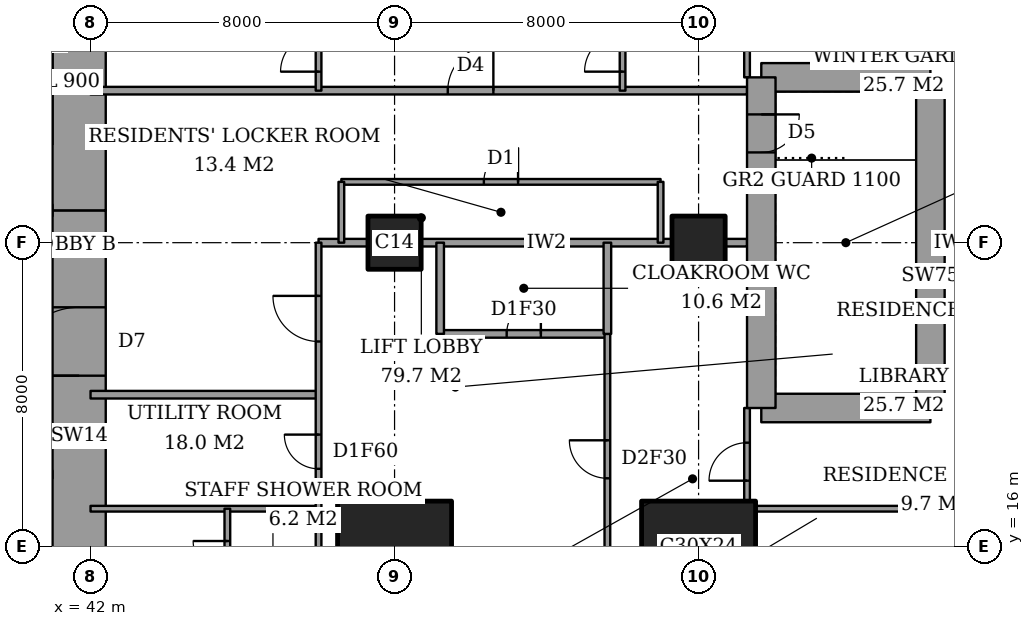
"""IFC4 building model, lengths in metres.
Left out: names, types, materials, properties, quantities, classifications, styles, units other than length and angle.
Written with IfcOpenShell. Run it as: python <this file> out.ifc"""

import sys

from ifc_helpers import new_model, si_unit, direction, frame, frame_2d, origin, origin_2d, place, context, subcontext, project, spatial, rectangle, extrude, element, fill, save


model = new_model("IFC4")
c1 = context("Model", 3, precision=1e-05, world=origin(), true_north=direction((0.0, 1.0)))
c2 = subcontext(c1, "Body", "Model", "MODEL_VIEW")
j1 = project(units=[si_unit("LENGTHUNIT", "METRE"), si_unit("PLANEANGLEUNIT", "RADIAN")], contexts=[c1])
p1 = place(None, origin())
s1 = spatial("IfcSite", under=j1, at=p1, CompositionType="ELEMENT")
p2 = place(p1, origin())
s2 = spatial("IfcBuilding", under=s1, at=p2, CompositionType="ELEMENT")
p3 = place(p2, frame((0.0, 0.0, 287.1)))
s3 = spatial("IfcBuildingStorey", under=s2, at=p3, CompositionType="ELEMENT", Elevation=287.1)
p4 = place(p3, frame((50.0, 16.0, 0.0), z_axis=(0.0, 0.0, 1.0), x_axis=(1.0, 0.0, 0.0)))
e1 = element("IfcColumn", 1, at=p4, inside=s3, PredefinedType="COLUMN", context=c2, shape_type="SweptSolid", body=[
    extrude(rectangle(XDim=3.0, YDim=2.4, at=origin_2d()), origin(), (0.0, 0.0, 1.0), 4.5),
])
p5 = place(p3, frame((50.0, 24.0, 0.0), z_axis=(0.0, 0.0, 1.0), x_axis=(1.0, 0.0, 0.0)))
e2 = element("IfcColumn", 2, at=p5, inside=s3, PredefinedType="COLUMN", context=c2, shape_type="SweptSolid", body=[
    extrude(rectangle(XDim=1.4, YDim=1.4, at=origin_2d()), origin(), (0.0, 0.0, 1.0), 4.5),
])
p6 = place(p3, frame((58.0, 16.0, 0.0), z_axis=(0.0, 0.0, 1.0), x_axis=(1.0, 0.0, 0.0)))
e3 = element("IfcColumn", 3, at=p6, inside=s3, PredefinedType="COLUMN", context=c2, shape_type="SweptSolid", body=[
    extrude(rectangle(XDim=3.0, YDim=2.4, at=origin_2d()), origin(), (0.0, 0.0, 1.0), 4.5),
])
p7 = place(p3, frame((58.0, 24.0, 0.0), z_axis=(0.0, 0.0, 1.0), x_axis=(1.0, 0.0, 0.0)))
e4 = element("IfcColumn", 4, at=p7, inside=s3, PredefinedType="COLUMN", context=c2, shape_type="SweptSolid", body=[
    extrude(rectangle(XDim=1.4, YDim=1.4, at=origin_2d()), origin(), (0.0, 0.0, 1.0), 4.5),
])
p8 = place(p3, frame((41.7, 13.0, 0.0), z_axis=(0.0, 0.0, 1.0), x_axis=(0.0, 1.0, 0.0)))
e5 = element("IfcWall", 5, at=p8, inside=s3, PredefinedType="SHEAR", context=c2, shape_type="SweptSolid", body=[
    extrude(rectangle(XDim=11.85, YDim=1.4, at=frame_2d((5.925, 0.0))), origin(), (0.0, 0.0, 1.0), 4.5),
])
p9 = place(p8, frame((7.5, 0.0, 0.0)))
e6 = element("IfcOpeningElement", 6, at=p9, cuts=e5, PredefinedType="OPENING", context=c2, shape_type="SweptSolid", body=[
    extrude(rectangle(XDim=1.8, YDim=2.4, at=frame_2d((0.9, 1.2))), frame((0.0, 0.71, 0.0), z_axis=(0.0, -1.0, 0.0), x_axis=(1.0, 0.0, 0.0)), (0.0, 0.0, 1.0), 1.42),
])
p10 = place(p3, frame((41.7, 24.85, 0.0), z_axis=(0.0, 0.0, 1.0), x_axis=(0.0, 1.0, 0.0)))
e7 = element("IfcWall", 7, at=p10, inside=s3, PredefinedType="SHEAR", context=c2, shape_type="SweptSolid", body=[
    extrude(rectangle(XDim=10.15, YDim=1.4, at=frame_2d((5.075, 0.0))), origin(), (0.0, 0.0, 1.0), 4.5),
])
p11 = place(p3, frame((59.65, 19.65, 0.0), z_axis=(0.0, 0.0, 1.0), x_axis=(1.0, 0.0, 0.0)))
e8 = element("IfcWall", 8, at=p11, inside=s3, PredefinedType="SHEAR", context=c2, shape_type="SweptSolid", body=[
    extrude(rectangle(XDim=4.45, YDim=0.75, at=frame_2d((2.225, 0.0))), origin(), (0.0, 0.0, 1.0), 4.5),
])
p12 = place(p3, frame((64.1, 19.65, 0.0), z_axis=(0.0, 0.0, 1.0), x_axis=(0.0, 1.0, 0.0)))
e9 = element("IfcWall", 9, at=p12, inside=s3, PredefinedType="SHEAR", context=c2, shape_type="SweptSolid", body=[
    extrude(rectangle(XDim=8.7, YDim=0.75, at=frame_2d((4.35, 0.0))), origin(), (0.0, 0.0, 1.0), 4.5),
])
p13 = place(p3, frame((64.1, 28.35, 0.0), z_axis=(0.0, 0.0, 1.0), x_axis=(-1.0, 0.0, 0.0)))
e10 = element("IfcWall", 10, at=p13, inside=s3, PredefinedType="SHEAR", context=c2, shape_type="SweptSolid", body=[
    extrude(rectangle(XDim=4.45, YDim=0.75, at=frame_2d((2.225, 0.0))), origin(), (0.0, 0.0, 1.0), 4.5),
])
p14 = place(p3, frame((59.65, 28.35, 0.0), z_axis=(0.0, 0.0, 1.0), x_axis=(0.0, -1.0, 0.0)))
e11 = element("IfcWall", 11, at=p14, inside=s3, PredefinedType="SHEAR", context=c2, shape_type="SweptSolid", body=[
    extrude(rectangle(XDim=8.7, YDim=0.75, at=frame_2d((4.35, 0.0))), origin(), (0.0, 0.0, 1.0), 4.5),
])
p15 = place(p14, frame((0.975, 0.0, 0.0)))
e12 = element("IfcOpeningElement", 12, at=p15, cuts=e11, PredefinedType="OPENING", context=c2, shape_type="SweptSolid", body=[
    extrude(rectangle(XDim=1.0, YDim=2.1, at=frame_2d((0.5, 1.05))), frame((0.0, 0.385, 0.0), z_axis=(0.0, -1.0, 0.0), x_axis=(1.0, 0.0, 0.0)), (0.0, 0.0, 1.0), 0.77),
])
p16 = place(p3, frame((42.0, 17.0, 0.0), z_axis=(0.0, 0.0, 1.0), x_axis=(1.0, 0.0, 0.0)))
e13 = element("IfcWall", 13, at=p16, inside=s3, PredefinedType="PARTITIONING", context=c2, shape_type="SweptSolid", body=[
    extrude(rectangle(XDim=6.0, YDim=0.15, at=frame_2d((3.0, 0.0))), origin(), (0.0, 0.0, 1.0), 4.2),
])
p17 = place(p3, frame((59.5, 17.0, 0.0), z_axis=(0.0, 0.0, 1.0), x_axis=(1.0, 0.0, 0.0)))
e14 = element("IfcWall", 14, at=p17, inside=s3, PredefinedType="PARTITIONING", context=c2, shape_type="SweptSolid", body=[
    extrude(rectangle(XDim=6.95, YDim=0.15, at=frame_2d((3.475, 0.0))), origin(), (0.0, 0.0, 1.0), 4.2),
])
p18 = place(p3, frame((42.0, 20.0, 0.0), z_axis=(0.0, 0.0, 1.0), x_axis=(1.0, 0.0, 0.0)))
e15 = element("IfcWall", 15, at=p18, inside=s3, PredefinedType="PARTITIONING", context=c2, shape_type="SweptSolid", body=[
    extrude(rectangle(XDim=6.0, YDim=0.2, at=frame_2d((3.0, 0.0))), origin(), (0.0, 0.0, 1.0), 4.2),
])
p19 = place(p3, frame((51.2, 21.6, 0.0), z_axis=(0.0, 0.0, 1.0), x_axis=(1.0, 0.0, 0.0)))
e16 = element("IfcWall", 16, at=p19, inside=s3, PredefinedType="PARTITIONING", context=c2, shape_type="SweptSolid", body=[
    extrude(rectangle(XDim=4.4, YDim=0.2, at=frame_2d((2.2, 0.0))), origin(), (0.0, 0.0, 1.0), 4.2),
])
p20 = place(p19, frame((1.75, 0.0, 0.0)))
e17 = element("IfcOpeningElement", 17, at=p20, cuts=e16, PredefinedType="OPENING", context=c2, shape_type="SweptSolid", body=[
    extrude(rectangle(XDim=0.9, YDim=2.1, at=frame_2d((0.45, 1.05))), frame((0.0, 0.11, 0.0), z_axis=(0.0, -1.0, 0.0), x_axis=(1.0, 0.0, 0.0)), (0.0, 0.0, 1.0), 0.22),
])
p21 = place(p3, frame((48.0, 24.0, 0.0), z_axis=(0.0, 0.0, 1.0), x_axis=(1.0, 0.0, 0.0)))
e18 = element("IfcWall", 18, at=p21, inside=s3, PredefinedType="PARTITIONING", context=c2, shape_type="SweptSolid", body=[
    extrude(rectangle(XDim=1.3, YDim=0.2, at=frame_2d((0.65, 0.0))), origin(), (0.0, 0.0, 1.0), 4.2),
])
p22 = place(p3, frame((50.7, 24.0, 0.0), z_axis=(0.0, 0.0, 1.0), x_axis=(1.0, 0.0, 0.0)))
e19 = element("IfcWall", 19, at=p22, inside=s3, PredefinedType="PARTITIONING", context=c2, shape_type="SweptSolid", body=[
    extrude(rectangle(XDim=6.6, YDim=0.2, at=frame_2d((3.3, 0.0))), origin(), (0.0, 0.0, 1.0), 4.2),
])
p23 = place(p3, frame((58.7, 24.0, 0.0), z_axis=(0.0, 0.0, 1.0), x_axis=(1.0, 0.0, 0.0)))
e20 = element("IfcWall", 20, at=p23, inside=s3, PredefinedType="PARTITIONING", context=c2, shape_type="SweptSolid", body=[
    extrude(rectangle(XDim=0.575, YDim=0.2, at=frame_2d((0.288, 0.0))), origin(), (0.0, 0.0, 1.0), 4.2),
])
p24 = place(p3, frame((64.475, 24.0, 0.0), z_axis=(0.0, 0.0, 1.0), x_axis=(1.0, 0.0, 0.0)))
e21 = element("IfcWall", 21, at=p24, inside=s3, PredefinedType="PARTITIONING", context=c2, shape_type="SweptSolid", body=[
    extrude(rectangle(XDim=0.475, YDim=0.15, at=frame_2d((0.237, 0.0))), origin(), (0.0, 0.0, 1.0), 4.2),
])
p25 = place(p3, frame((48.6, 25.6, 0.0), z_axis=(0.0, 0.0, 1.0), x_axis=(1.0, 0.0, 0.0)))
e22 = element("IfcWall", 22, at=p25, inside=s3, PredefinedType="PARTITIONING", context=c2, shape_type="SweptSolid", body=[
    extrude(rectangle(XDim=8.4, YDim=0.15, at=frame_2d((4.2, 0.0))), origin(), (0.0, 0.0, 1.0), 4.2),
])
p26 = place(p25, frame((3.75, 0.0, 0.0)))
e23 = element("IfcOpeningElement", 23, at=p26, cuts=e22, PredefinedType="OPENING", context=c2, shape_type="SweptSolid", body=[
    extrude(rectangle(XDim=0.9, YDim=2.1, at=frame_2d((0.45, 1.05))), frame((0.0, 0.085, 0.0), z_axis=(0.0, -1.0, 0.0), x_axis=(1.0, 0.0, 0.0)), (0.0, 0.0, 1.0), 0.17),
])
p27 = place(p3, frame((42.0, 28.0, 0.0), z_axis=(0.0, 0.0, 1.0), x_axis=(1.0, 0.0, 0.0)))
e24 = element("IfcWall", 24, at=p27, inside=s3, PredefinedType="PARTITIONING", context=c2, shape_type="SweptSolid", body=[
    extrude(rectangle(XDim=17.275, YDim=0.2, at=frame_2d((8.637, 0.0))), origin(), (0.0, 0.0, 1.0), 4.2),
])
p28 = place(p27, frame((9.4, 0.0, 0.0)))
e25 = element("IfcOpeningElement", 25, at=p28, cuts=e24, PredefinedType="OPENING", context=c2, shape_type="SweptSolid", body=[
    extrude(rectangle(XDim=1.2, YDim=2.4, at=frame_2d((0.6, 1.2))), frame((0.0, 0.11, 0.0), z_axis=(0.0, -1.0, 0.0), x_axis=(1.0, 0.0, 0.0)), (0.0, 0.0, 1.0), 0.22),
])
p29 = place(p3, frame((45.6, 14.4, 0.0), z_axis=(0.0, 0.0, 1.0), x_axis=(0.0, 1.0, 0.0)))
e26 = element("IfcWall", 26, at=p29, inside=s3, PredefinedType="PARTITIONING", context=c2, shape_type="SweptSolid", body=[
    extrude(rectangle(XDim=2.6, YDim=0.15, at=frame_2d((1.3, 0.0))), origin(), (0.0, 0.0, 1.0), 4.2),
])
p30 = place(p29, frame((0.85, 0.0, 0.0)))
e27 = element("IfcOpeningElement", 27, at=p30, cuts=e26, PredefinedType="OPENING", context=c2, shape_type="SweptSolid", body=[
    extrude(rectangle(XDim=0.9, YDim=2.1, at=frame_2d((0.45, 1.05))), frame((0.0, 0.085, 0.0), z_axis=(0.0, -1.0, 0.0), x_axis=(1.0, 0.0, 0.0)), (0.0, 0.0, 1.0), 0.17),
])
p31 = place(p3, frame((48.0, 10.6, 0.0), z_axis=(0.0, 0.0, 1.0), x_axis=(0.0, 1.0, 0.0)))
e28 = element("IfcWall", 28, at=p31, inside=s3, PredefinedType="PARTITIONING", context=c2, shape_type="SweptSolid", body=[
    extrude(rectangle(XDim=13.4, YDim=0.15, at=frame_2d((6.7, 0.0))), origin(), (0.0, 0.0, 1.0), 4.2),
])
p32 = place(p31, frame((10.8, 0.0, 0.0)))
e29 = element("IfcOpeningElement", 29, at=p32, cuts=e28, PredefinedType="OPENING", context=c2, shape_type="SweptSolid", body=[
    extrude(rectangle(XDim=1.2, YDim=2.4, at=frame_2d((0.6, 1.2))), frame((0.0, 0.085, 0.0), z_axis=(0.0, -1.0, 0.0), x_axis=(1.0, 0.0, 0.0)), (0.0, 0.0, 1.0), 0.17),
])
p33 = place(p31, frame((7.45, 0.0, 0.0)))
e30 = element("IfcOpeningElement", 30, at=p33, cuts=e28, PredefinedType="OPENING", context=c2, shape_type="SweptSolid", body=[
    extrude(rectangle(XDim=0.9, YDim=2.1, at=frame_2d((0.45, 1.05))), frame((0.0, 0.085, 0.0), z_axis=(0.0, -1.0, 0.0), x_axis=(1.0, 0.0, 0.0)), (0.0, 0.0, 1.0), 0.17),
])
p34 = place(p3, frame((48.0, 28.0, 0.0), z_axis=(0.0, 0.0, 1.0), x_axis=(0.0, 1.0, 0.0)))
e31 = element("IfcWall", 31, at=p34, inside=s3, PredefinedType="PARTITIONING", context=c2, shape_type="SweptSolid", body=[
    extrude(rectangle(XDim=9.4, YDim=0.15, at=frame_2d((4.7, 0.0))), origin(), (0.0, 0.0, 1.0), 4.2),
])
p35 = place(p34, frame((0.5, 0.0, 0.0)))
e32 = element("IfcOpeningElement", 32, at=p35, cuts=e31, PredefinedType="OPENING", context=c2, shape_type="SweptSolid", body=[
    extrude(rectangle(XDim=1.0, YDim=2.1, at=frame_2d((0.5, 1.05))), frame((0.0, 0.085, 0.0), z_axis=(0.0, -1.0, 0.0), x_axis=(1.0, 0.0, 0.0)), (0.0, 0.0, 1.0), 0.17),
])
p36 = place(p3, frame((48.6, 24.0, 0.0), z_axis=(0.0, 0.0, 1.0), x_axis=(0.0, 1.0, 0.0)))
e33 = element("IfcWall", 33, at=p36, inside=s3, PredefinedType="PARTITIONING", context=c2, shape_type="SweptSolid", body=[
    extrude(rectangle(XDim=1.6, YDim=0.15, at=frame_2d((0.8, 0.0))), origin(), (0.0, 0.0, 1.0), 4.2),
])
for number, where, z_axis, x_axis in (
    (34, (51.2, 21.6, 0.0), (0.0, 0.0, 1.0), (0.0, 1.0, 0.0)),
    (35, (55.6, 21.6, 0.0), (0.0, 0.0, 1.0), (0.0, 1.0, 0.0)),
):
    element("IfcWall", number, at=place(p3, frame(where, z_axis=z_axis, x_axis=x_axis)), inside=s3, PredefinedType="PARTITIONING", context=c2, shape_type="SweptSolid", body=[
        extrude(rectangle(XDim=2.4, YDim=0.2, at=frame_2d((1.2, 0.0))), origin(), (0.0, 0.0, 1.0), 4.2),
    ])
p37 = place(p3, frame((55.6, 10.6, 0.0), z_axis=(0.0, 0.0, 1.0), x_axis=(0.0, 1.0, 0.0)))
e36 = element("IfcWall", 36, at=p37, inside=s3, PredefinedType="PARTITIONING", context=c2, shape_type="SweptSolid", body=[
    extrude(rectangle(XDim=11.0, YDim=0.15, at=frame_2d((5.5, 0.0))), origin(), (0.0, 0.0, 1.0), 4.2),
])
p38 = place(p37, frame((7.2, 0.0, 0.0)))
e37 = element("IfcOpeningElement", 37, at=p38, cuts=e36, PredefinedType="OPENING", context=c2, shape_type="SweptSolid", body=[
    extrude(rectangle(XDim=1.0, YDim=2.1, at=frame_2d((0.5, 1.05))), frame((0.0, 0.085, 0.0), z_axis=(0.0, -1.0, 0.0), x_axis=(1.0, 0.0, 0.0)), (0.0, 0.0, 1.0), 0.17),
])
p39 = place(p3, frame((56.0, 28.0, 0.0), z_axis=(0.0, 0.0, 1.0), x_axis=(0.0, 1.0, 0.0)))
e38 = element("IfcWall", 38, at=p39, inside=s3, PredefinedType="PARTITIONING", context=c2, shape_type="SweptSolid", body=[
    extrude(rectangle(XDim=9.4, YDim=0.15, at=frame_2d((4.7, 0.0))), origin(), (0.0, 0.0, 1.0), 4.2),
])
p40 = place(p39, frame((0.5, 0.0, 0.0)))
e39 = element("IfcOpeningElement", 39, at=p40, cuts=e38, PredefinedType="OPENING", context=c2, shape_type="SweptSolid", body=[
    extrude(rectangle(XDim=1.0, YDim=2.1, at=frame_2d((0.5, 1.05))), frame((0.0, 0.085, 0.0), z_axis=(0.0, -1.0, 0.0), x_axis=(1.0, 0.0, 0.0)), (0.0, 0.0, 1.0), 0.17),
])
p41 = place(p3, frame((57.0, 24.0, 0.0), z_axis=(0.0, 0.0, 1.0), x_axis=(0.0, 1.0, 0.0)))
e40 = element("IfcWall", 40, at=p41, inside=s3, PredefinedType="PARTITIONING", context=c2, shape_type="SweptSolid", body=[
    extrude(rectangle(XDim=1.6, YDim=0.15, at=frame_2d((0.8, 0.0))), origin(), (0.0, 0.0, 1.0), 4.2),
])
p42 = place(p3, frame((59.275, 17.2, 0.0), z_axis=(0.0, 0.0, 1.0), x_axis=(0.0, 1.0, 0.0)))
e41 = element("IfcWall", 41, at=p42, inside=s3, PredefinedType="PARTITIONING", context=c2, shape_type="SweptSolid", body=[
    extrude(rectangle(XDim=2.45, YDim=0.15, at=frame_2d((1.225, 0.0))), origin(), (0.0, 0.0, 1.0), 4.2),
])
p43 = place(p42, frame((0.538, 0.0, 0.0)))
e42 = element("IfcOpeningElement", 42, at=p43, cuts=e41, PredefinedType="OPENING", context=c2, shape_type="SweptSolid", body=[
    extrude(rectangle(XDim=1.0, YDim=2.1, at=frame_2d((0.5, 1.05))), frame((0.0, 0.085, 0.0), z_axis=(0.0, -1.0, 0.0), x_axis=(1.0, 0.0, 0.0)), (0.0, 0.0, 1.0), 0.17),
])
p44 = place(p3, frame((59.275, 28.35, 0.0), z_axis=(0.0, 0.0, 1.0), x_axis=(0.0, 1.0, 0.0)))
e43 = element("IfcWall", 43, at=p44, inside=s3, PredefinedType="PARTITIONING", context=c2, shape_type="SweptSolid", body=[
    extrude(rectangle(XDim=2.45, YDim=0.15, at=frame_2d((1.225, 0.0))), origin(), (0.0, 0.0, 1.0), 4.2),
])
p45 = place(p44, frame((0.913, 0.0, 0.0)))
e44 = element("IfcOpeningElement", 44, at=p45, cuts=e43, PredefinedType="OPENING", context=c2, shape_type="SweptSolid", body=[
    extrude(rectangle(XDim=1.0, YDim=2.1, at=frame_2d((0.5, 1.05))), frame((0.0, 0.085, 0.0), z_axis=(0.0, -1.0, 0.0), x_axis=(1.0, 0.0, 0.0)), (0.0, 0.0, 1.0), 0.17),
])
p46 = place(p3, frame((28.3, 17.9, 0.0), z_axis=(0.0, 0.0, 1.0), x_axis=(1.0, 0.0, 0.0)))
e45 = element("IfcWall", 45, at=p46, inside=s3, PredefinedType="PARTITIONING", context=c2, shape_type="SweptSolid", body=[
    extrude(rectangle(XDim=12.7, YDim=0.2, at=frame_2d((6.35, 0.0))), origin(), (0.0, 0.0, 1.0), 4.5),
])
p47 = place(p46, frame((1.0, 0.0, 0.0)))
e46 = element("IfcOpeningElement", 46, at=p47, cuts=e45, PredefinedType="OPENING", context=c2, shape_type="SweptSolid", body=[
    extrude(rectangle(XDim=1.0, YDim=2.1, at=frame_2d((0.5, 1.05))), frame((0.0, 0.11, 0.0), z_axis=(0.0, -1.0, 0.0), x_axis=(1.0, 0.0, 0.0)), (0.0, 0.0, 1.0), 0.22),
])
p48 = place(p46, frame((7.45, 0.0, 0.0)))
e47 = element("IfcOpeningElement", 47, at=p48, cuts=e45, PredefinedType="OPENING", context=c2, shape_type="SweptSolid", body=[
    extrude(rectangle(XDim=0.9, YDim=2.1, at=frame_2d((0.45, 1.05))), frame((0.0, 0.11, 0.0), z_axis=(0.0, -1.0, 0.0), x_axis=(1.0, 0.0, 0.0)), (0.0, 0.0, 1.0), 0.22),
])
p49 = place(p46, frame((10.6, 0.0, 0.0)))
e48 = element("IfcOpeningElement", 48, at=p49, cuts=e45, PredefinedType="OPENING", context=c2, shape_type="SweptSolid", body=[
    extrude(rectangle(XDim=1.2, YDim=2.1, at=frame_2d((0.6, 1.05))), frame((0.0, 0.11, 0.0), z_axis=(0.0, -1.0, 0.0), x_axis=(1.0, 0.0, 0.0)), (0.0, 0.0, 1.0), 0.22),
])
p50 = place(p43, origin())
e49 = element("IfcDoor", 49, at=p50, inside=s3, OperationType="SINGLE_SWING_RIGHT", PredefinedType="DOOR", context=c2, shape_type="SweptSolid", body=[
    extrude(rectangle(XDim=1.0, YDim=2.1, at=frame_2d((0.5, 1.05))), frame((0.0, 0.025, 0.0), z_axis=(0.0, -1.0, 0.0), x_axis=(1.0, 0.0, 0.0)), (0.0, 0.0, 1.0), 0.05),
])
fill(e42, e49)
p51 = place(p38, origin())
e50 = element("IfcDoor", 50, at=p51, inside=s3, OperationType="SINGLE_SWING_LEFT", PredefinedType="DOOR", context=c2, shape_type="SweptSolid", body=[
    extrude(rectangle(XDim=1.0, YDim=2.1, at=frame_2d((0.5, 1.05))), frame((0.0, 0.025, 0.0), z_axis=(0.0, -1.0, 0.0), x_axis=(1.0, 0.0, 0.0)), (0.0, 0.0, 1.0), 0.05),
])
fill(e37, e50)
p52 = place(p20, origin())
e51 = element("IfcDoor", 51, at=p52, inside=s3, OperationType="SINGLE_SWING_LEFT", PredefinedType="DOOR", context=c2, shape_type="SweptSolid", body=[
    extrude(rectangle(XDim=0.9, YDim=2.1, at=frame_2d((0.45, 1.05))), frame((0.0, 0.025, 0.0), z_axis=(0.0, -1.0, 0.0), x_axis=(1.0, 0.0, 0.0)), (0.0, 0.0, 1.0), 0.05),
])
fill(e17, e51)
p53 = place(p32, origin())
e52 = element("IfcDoor", 52, at=p53, inside=s3, OperationType="SINGLE_SWING_LEFT", PredefinedType="DOOR", context=c2, shape_type="SweptSolid", body=[
    extrude(rectangle(XDim=1.2, YDim=2.4, at=frame_2d((0.6, 1.2))), frame((0.0, 0.025, 0.0), z_axis=(0.0, -1.0, 0.0), x_axis=(1.0, 0.0, 0.0)), (0.0, 0.0, 1.0), 0.05),
])
fill(e29, e52)
p54 = place(p30, origin())
e53 = element("IfcDoor", 53, at=p54, inside=s3, OperationType="SINGLE_SWING_LEFT", PredefinedType="DOOR", context=c2, shape_type="SweptSolid", body=[
    extrude(rectangle(XDim=0.9, YDim=2.1, at=frame_2d((0.45, 1.05))), frame((0.0, 0.025, 0.0), z_axis=(0.0, -1.0, 0.0), x_axis=(1.0, 0.0, 0.0)), (0.0, 0.0, 1.0), 0.05),
])
fill(e27, e53)
p55 = place(p33, origin())
e54 = element("IfcDoor", 54, at=p55, inside=s3, OperationType="SINGLE_SWING_LEFT", PredefinedType="DOOR", context=c2, shape_type="SweptSolid", body=[
    extrude(rectangle(XDim=0.9, YDim=2.1, at=frame_2d((0.45, 1.05))), frame((0.0, 0.025, 0.0), z_axis=(0.0, -1.0, 0.0), x_axis=(1.0, 0.0, 0.0)), (0.0, 0.0, 1.0), 0.05),
])
fill(e30, e54)
p56 = place(p40, origin())
e55 = element("IfcDoor", 55, at=p56, inside=s3, OperationType="SINGLE_SWING_RIGHT", PredefinedType="DOOR", context=c2, shape_type="SweptSolid", body=[
    extrude(rectangle(XDim=1.0, YDim=2.1, at=frame_2d((0.5, 1.05))), frame((0.0, 0.025, 0.0), z_axis=(0.0, -1.0, 0.0), x_axis=(1.0, 0.0, 0.0)), (0.0, 0.0, 1.0), 0.05),
])
fill(e39, e55)
p57 = place(p28, origin())
e56 = element("IfcDoor", 56, at=p57, inside=s3, OperationType="SINGLE_SWING_LEFT", PredefinedType="DOOR", context=c2, shape_type="SweptSolid", body=[
    extrude(rectangle(XDim=1.2, YDim=2.4, at=frame_2d((0.6, 1.2))), frame((0.0, 0.025, 0.0), z_axis=(0.0, -1.0, 0.0), x_axis=(1.0, 0.0, 0.0)), (0.0, 0.0, 1.0), 0.05),
])
fill(e25, e56)
p58 = place(p35, origin())
e57 = element("IfcDoor", 57, at=p58, inside=s3, OperationType="SINGLE_SWING_RIGHT", PredefinedType="DOOR", context=c2, shape_type="SweptSolid", body=[
    extrude(rectangle(XDim=1.0, YDim=2.1, at=frame_2d((0.5, 1.05))), frame((0.0, 0.025, 0.0), z_axis=(0.0, -1.0, 0.0), x_axis=(1.0, 0.0, 0.0)), (0.0, 0.0, 1.0), 0.05),
])
fill(e32, e57)
p59 = place(p26, origin())
e58 = element("IfcDoor", 58, at=p59, inside=s3, OperationType="SINGLE_SWING_LEFT", PredefinedType="DOOR", context=c2, shape_type="SweptSolid", body=[
    extrude(rectangle(XDim=0.9, YDim=2.1, at=frame_2d((0.45, 1.05))), frame((0.0, 0.025, 0.0), z_axis=(0.0, -1.0, 0.0), x_axis=(1.0, 0.0, 0.0)), (0.0, 0.0, 1.0), 0.05),
])
fill(e23, e58)
p60 = place(p9, origin())
e59 = element("IfcDoor", 59, at=p60, inside=s3, OperationType="DOUBLE_DOOR_DOUBLE_SWING", PredefinedType="DOOR", context=c2, shape_type="SweptSolid", body=[
    extrude(rectangle(XDim=1.8, YDim=2.4, at=frame_2d((0.9, 1.2))), frame((0.0, 0.025, 0.0), z_axis=(0.0, -1.0, 0.0), x_axis=(1.0, 0.0, 0.0)), (0.0, 0.0, 1.0), 0.05),
])
fill(e6, e59)
p61 = place(p15, origin())
e60 = element("IfcDoor", 60, at=p61, inside=s3, OperationType="SINGLE_SWING_RIGHT", PredefinedType="DOOR", context=c2, shape_type="SweptSolid", body=[
    extrude(rectangle(XDim=1.0, YDim=2.1, at=frame_2d((0.5, 1.05))), frame((0.0, 0.025, 0.0), z_axis=(0.0, -1.0, 0.0), x_axis=(1.0, 0.0, 0.0)), (0.0, 0.0, 1.0), 0.05),
])
fill(e12, e60)
save(model, sys.argv[1])
